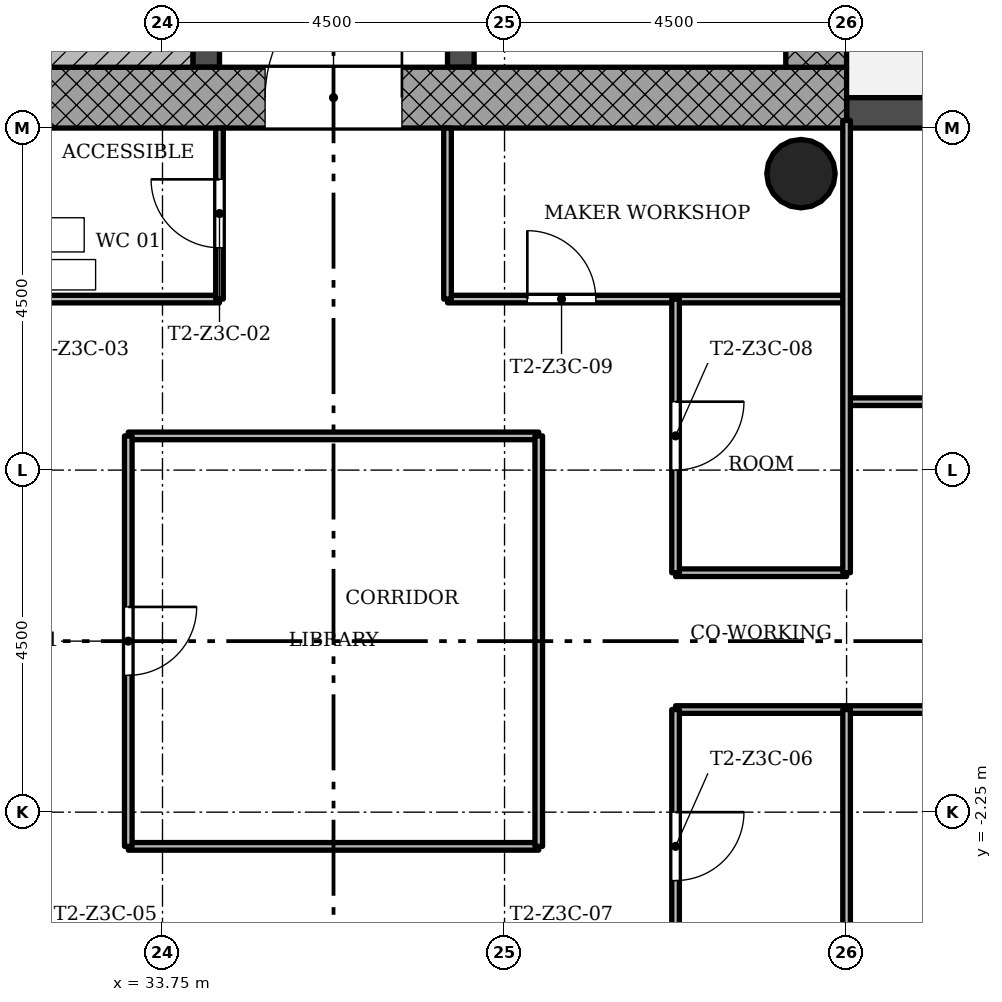
"""IFC4 building model, lengths in metres.
Left out: names, types, materials, properties, quantities, classifications, styles, units other than length and angle.
Written with IfcOpenShell. Run it as: python <this file> out.ifc"""

import sys

from ifc_helpers import new_model, si_unit, direction, frame, frame_2d, origin, origin_2d, place, context, subcontext, project, spatial, rectangle, hollow_circle, extrude, element, fill, save


model = new_model("IFC4")
c1 = context("Model", 3, precision=1e-05, world=origin(), true_north=direction((0.0, 1.0)))
c2 = subcontext(c1, "Body", "Model", "MODEL_VIEW")
j1 = project(units=[si_unit("LENGTHUNIT", "METRE"), si_unit("PLANEANGLEUNIT", "RADIAN")], contexts=[c1])
p1 = place(None, origin())
s1 = spatial("IfcSite", under=j1, at=p1, CompositionType="ELEMENT")
p2 = place(p1, origin())
s2 = spatial("IfcBuilding", under=s1, at=p2, CompositionType="ELEMENT")
p3 = place(p2, frame((0.0, 0.0, 160.9)))
s3 = spatial("IfcBuildingStorey", under=s2, at=p3, CompositionType="ELEMENT", Elevation=160.9)
p4 = place(p3, frame((30.05, 7.15, 0.0), z_axis=(0.0, 0.0, 1.0), x_axis=(1.0, 0.0, 0.0)))
e1 = element("IfcWall", 1, at=p4, inside=s3, PredefinedType="SHEAR", context=c2, shape_type="SweptSolid", body=[
    extrude(rectangle(XDim=12.7, YDim=0.8, at=frame_2d((6.35, 0.0))), origin(), (0.0, 0.0, 1.0), 3.4),
])
p5 = place(p4, frame((5.05, 0.0, 0.0)))
e2 = element("IfcOpeningElement", 2, at=p5, cuts=e1, PredefinedType="OPENING", context=c2, shape_type="SweptSolid", body=[
    extrude(rectangle(XDim=1.8, YDim=2.1, at=frame_2d((0.9, 1.05))), frame((0.0, 0.41, 0.0), z_axis=(0.0, -1.0, 0.0), x_axis=(1.0, 0.0, 0.0)), (0.0, 0.0, 1.0), 0.82),
])
p6 = place(p3, frame((42.35, 7.55, 0.0), z_axis=(0.0, 0.0, 1.0), x_axis=(0.0, 1.0, 0.0)))
e3 = element("IfcWall", 3, at=p6, inside=s3, PredefinedType="SHEAR", context=c2, shape_type="SweptSolid", body=[
    extrude(rectangle(XDim=8.2, YDim=0.8, at=frame_2d((4.1, 0.0))), origin(), (0.0, 0.0, 1.0), 3.4),
])
p7 = place(p3, frame((34.325, 7.55, 0.0), z_axis=(0.0, 0.0, 1.0), x_axis=(0.0, 1.0, 0.0)))
e4 = element("IfcWall", 4, at=p7, inside=s3, PredefinedType="SHEAR", context=c2, shape_type="SweptSolid", body=[
    extrude(rectangle(XDim=7.4, YDim=0.35, at=frame_2d((3.7, 0.0))), origin(), (0.0, 0.0, 1.0), 3.4),
])
p8 = place(p7, frame((0.85, 0.0, 0.0)))
e5 = element("IfcOpeningElement", 5, at=p8, cuts=e4, PredefinedType="OPENING", context=c2, shape_type="SweptSolid", body=[
    extrude(rectangle(XDim=0.9, YDim=2.1, at=frame_2d((0.45, 1.05))), frame((0.0, 0.185, 0.0), z_axis=(0.0, -1.0, 0.0), x_axis=(1.0, 0.0, 0.0)), (0.0, 0.0, 1.0), 0.37),
])
p9 = place(p3, frame((37.675, 7.55, 0.0), z_axis=(0.0, 0.0, 1.0), x_axis=(0.0, 1.0, 0.0)))
e6 = element("IfcWall", 6, at=p9, inside=s3, PredefinedType="SHEAR", context=c2, shape_type="SweptSolid", body=[
    extrude(rectangle(XDim=7.4, YDim=0.35, at=frame_2d((3.7, 0.0))), origin(), (0.0, 0.0, 1.0), 3.4),
])
p10 = place(p9, frame((0.95, 0.0, 0.0)))
e7 = element("IfcOpeningElement", 7, at=p10, cuts=e6, PredefinedType="OPENING", context=c2, shape_type="SweptSolid", body=[
    extrude(rectangle(XDim=1.1, YDim=2.1, at=frame_2d((0.55, 1.05))), frame((0.0, 0.185, 0.0), z_axis=(0.0, -1.0, 0.0), x_axis=(1.0, 0.0, 0.0)), (0.0, 0.0, 1.0), 0.37),
])
p11 = place(p9, frame((3.15, 0.0, 0.0)))
e8 = element("IfcOpeningElement", 8, at=p11, cuts=e6, PredefinedType="OPENING", context=c2, shape_type="SweptSolid", body=[
    extrude(rectangle(XDim=1.1, YDim=2.1, at=frame_2d((0.55, 1.05))), frame((0.0, 0.185, 0.0), z_axis=(0.0, -1.0, 0.0), x_axis=(1.0, 0.0, 0.0)), (0.0, 0.0, 1.0), 0.37),
])
p12 = place(p9, frame((5.35, 0.0, 0.0)))
e9 = element("IfcOpeningElement", 9, at=p12, cuts=e6, PredefinedType="OPENING", context=c2, shape_type="SweptSolid", body=[
    extrude(rectangle(XDim=1.1, YDim=2.1, at=frame_2d((0.55, 1.05))), frame((0.0, 0.185, 0.0), z_axis=(0.0, -1.0, 0.0), x_axis=(1.0, 0.0, 0.0)), (0.0, 0.0, 1.0), 0.37),
])
p13 = place(p3, frame((42.15, 6.15, 0.0), z_axis=(0.0, 0.0, 1.0), x_axis=(1.0, 0.0, 0.0)))
e10 = element("IfcColumn", 10, at=p13, inside=s3, PredefinedType="COLUMN", context=c2, shape_type="SweptSolid", body=[
    extrude(hollow_circle(Radius=0.45, WallThickness=0.032, at=origin_2d()), origin(), (0.0, 0.0, 1.0), 3.4),
])
p14 = place(p3, frame((47.25, 6.95, -0.02), z_axis=(0.0, 0.0, 1.0), x_axis=(-1.0, 0.0, 0.0)))
e11 = element("IfcWall", 11, at=p14, inside=s3, PredefinedType="STANDARD", context=c2, shape_type="SweptSolid", body=[
    extrude(rectangle(XDim=4.5, YDim=0.4, at=frame_2d((2.25, 0.0))), origin(), (0.0, 0.0, 1.0), 3.12),
])
p15 = place(p14, frame((1.35, 0.0, 0.02)))
e12 = element("IfcOpeningElement", 12, at=p15, cuts=e11, PredefinedType="OPENING", context=c2, shape_type="SweptSolid", body=[
    extrude(rectangle(XDim=1.8, YDim=2.1, at=frame_2d((0.9, 1.05))), frame((0.0, 0.21, 0.0), z_axis=(0.0, -1.0, 0.0), x_axis=(1.0, 0.0, 0.0)), (0.0, 0.0, 1.0), 0.42),
])
p16 = place(p3, frame((38.7, -2.7, 0.0), z_axis=(0.0, 0.0, 1.0), x_axis=(-1.0, 0.0, 0.0)))
e13 = element("IfcWall", 13, at=p16, inside=s3, PredefinedType="PARTITIONING", context=c2, shape_type="SweptSolid", body=[
    extrude(rectangle(XDim=5.4, YDim=0.1, at=frame_2d((2.7, 0.0))), origin(), (0.0, 0.0, 1.0), 3.0),
])
p17 = place(p3, frame((44.55, -0.9, 0.0), z_axis=(0.0, 0.0, 1.0), x_axis=(-1.0, 0.0, 0.0)))
e14 = element("IfcWall", 14, at=p17, inside=s3, PredefinedType="PARTITIONING", context=c2, shape_type="SweptSolid", body=[
    extrude(rectangle(XDim=4.05, YDim=0.1, at=frame_2d((2.025, 0.0))), origin(), (0.0, 0.0, 1.0), 3.0),
])
p18 = place(p3, frame((42.75, 0.9, 0.0), z_axis=(0.0, 0.0, 1.0), x_axis=(-1.0, 0.0, 0.0)))
e15 = element("IfcWall", 15, at=p18, inside=s3, PredefinedType="PARTITIONING", context=c2, shape_type="SweptSolid", body=[
    extrude(rectangle(XDim=2.25, YDim=0.1, at=frame_2d((1.125, 0.0))), origin(), (0.0, 0.0, 1.0), 3.0),
])
p19 = place(p3, frame((38.7, 2.7, 0.0), z_axis=(0.0, 0.0, 1.0), x_axis=(-1.0, 0.0, 0.0)))
e16 = element("IfcWall", 16, at=p19, inside=s3, PredefinedType="PARTITIONING", context=c2, shape_type="SweptSolid", body=[
    extrude(rectangle(XDim=5.4, YDim=0.1, at=frame_2d((2.7, 0.0))), origin(), (0.0, 0.0, 1.0), 3.0),
])
p20 = place(p3, frame((47.25, 3.15, 0.0), z_axis=(0.0, 0.0, 1.0), x_axis=(-1.0, 0.0, 0.0)))
e17 = element("IfcWall", 17, at=p20, inside=s3, PredefinedType="PARTITIONING", context=c2, shape_type="SweptSolid", body=[
    extrude(rectangle(XDim=4.5, YDim=0.1, at=frame_2d((2.25, 0.0))), origin(), (0.0, 0.0, 1.0), 3.0),
])
p21 = place(p20, frame((1.8, 0.0, 0.0)))
e18 = element("IfcOpeningElement", 18, at=p21, cuts=e17, PredefinedType="OPENING", context=c2, shape_type="SweptSolid", body=[
    extrude(rectangle(XDim=0.9, YDim=2.1, at=frame_2d((0.45, 1.05))), frame((0.0, 0.06, 0.0), z_axis=(0.0, -1.0, 0.0), x_axis=(1.0, 0.0, 0.0)), (0.0, 0.0, 1.0), 0.12),
])
p22 = place(p3, frame((42.75, 4.5, 0.0), z_axis=(0.0, 0.0, 1.0), x_axis=(-1.0, 0.0, 0.0)))
e19 = element("IfcWall", 19, at=p22, inside=s3, PredefinedType="PARTITIONING", context=c2, shape_type="SweptSolid", body=[
    extrude(rectangle(XDim=5.25, YDim=0.1, at=frame_2d((2.625, 0.0))), origin(), (0.0, 0.0, 1.0), 3.0),
])
p23 = place(p22, frame((3.3, 0.0, 0.0)))
e20 = element("IfcOpeningElement", 20, at=p23, cuts=e19, PredefinedType="OPENING", context=c2, shape_type="SweptSolid", body=[
    extrude(rectangle(XDim=0.9, YDim=2.1, at=frame_2d((0.45, 1.05))), frame((0.0, 0.06, 0.0), z_axis=(0.0, -1.0, 0.0), x_axis=(1.0, 0.0, 0.0)), (0.0, 0.0, 1.0), 0.12),
])
p24 = place(p3, frame((34.5, 4.5, 0.0), z_axis=(0.0, 0.0, 1.0), x_axis=(-1.0, 0.0, 0.0)))
e21 = element("IfcWall", 21, at=p24, inside=s3, PredefinedType="PARTITIONING", context=c2, shape_type="SweptSolid", body=[
    extrude(rectangle(XDim=3.0, YDim=0.1, at=frame_2d((1.5, 0.0))), origin(), (0.0, 0.0, 1.0), 3.0),
])
for number, where, z_axis, x_axis in (
    (22, (42.75, -6.85, 0.0), (0.0, 0.0, 1.0), (0.0, 1.0, 0.0)),
    (23, (42.75, 0.9, 0.0), (0.0, 0.0, 1.0), (0.0, 1.0, 0.0)),
):
    element("IfcWall", number, at=place(p3, frame(where, z_axis=z_axis, x_axis=x_axis)), inside=s3, PredefinedType="PARTITIONING", context=c2, shape_type="SweptSolid", body=[
        extrude(rectangle(XDim=5.95, YDim=0.1, at=frame_2d((2.975, 0.0))), origin(), (0.0, 0.0, 1.0), 3.0),
    ])
p25 = place(p3, frame((40.5, -6.75, 0.0), z_axis=(0.0, 0.0, 1.0), x_axis=(0.0, 1.0, 0.0)))
e24 = element("IfcWall", 24, at=p25, inside=s3, PredefinedType="PARTITIONING", context=c2, shape_type="SweptSolid", body=[
    extrude(rectangle(XDim=5.85, YDim=0.1, at=frame_2d((2.925, 0.0))), origin(), (0.0, 0.0, 1.0), 3.0),
])
p26 = place(p25, frame((3.6, 0.0, 0.0)))
e25 = element("IfcOpeningElement", 25, at=p26, cuts=e24, PredefinedType="OPENING", context=c2, shape_type="SweptSolid", body=[
    extrude(rectangle(XDim=0.9, YDim=2.1, at=frame_2d((0.45, 1.05))), frame((0.0, 0.06, 0.0), z_axis=(0.0, -1.0, 0.0), x_axis=(1.0, 0.0, 0.0)), (0.0, 0.0, 1.0), 0.12),
])
p27 = place(p3, frame((40.5, 0.9, 0.0), z_axis=(0.0, 0.0, 1.0), x_axis=(0.0, 1.0, 0.0)))
e26 = element("IfcWall", 26, at=p27, inside=s3, PredefinedType="PARTITIONING", context=c2, shape_type="SweptSolid", body=[
    extrude(rectangle(XDim=3.6, YDim=0.1, at=frame_2d((1.8, 0.0))), origin(), (0.0, 0.0, 1.0), 3.0),
])
p28 = place(p27, frame((1.35, 0.0, 0.0)))
e27 = element("IfcOpeningElement", 27, at=p28, cuts=e26, PredefinedType="OPENING", context=c2, shape_type="SweptSolid", body=[
    extrude(rectangle(XDim=0.9, YDim=2.1, at=frame_2d((0.45, 1.05))), frame((0.0, 0.06, 0.0), z_axis=(0.0, -1.0, 0.0), x_axis=(1.0, 0.0, 0.0)), (0.0, 0.0, 1.0), 0.12),
])
p29 = place(p3, frame((38.7, -2.7, 0.0), z_axis=(0.0, 0.0, 1.0), x_axis=(0.0, 1.0, 0.0)))
e28 = element("IfcWall", 28, at=p29, inside=s3, PredefinedType="PARTITIONING", context=c2, shape_type="SweptSolid", body=[
    extrude(rectangle(XDim=5.4, YDim=0.1, at=frame_2d((2.7, 0.0))), origin(), (0.0, 0.0, 1.0), 3.0),
])
p30 = place(p3, frame((37.5, 4.5, 0.0), z_axis=(0.0, 0.0, 1.0), x_axis=(0.0, 1.0, 0.0)))
e29 = element("IfcWall", 29, at=p30, inside=s3, PredefinedType="PARTITIONING", context=c2, shape_type="SweptSolid", body=[
    extrude(rectangle(XDim=2.25, YDim=0.1, at=frame_2d((1.125, 0.0))), origin(), (0.0, 0.0, 1.0), 3.0),
])
p31 = place(p3, frame((34.5, 4.5, 0.0), z_axis=(0.0, 0.0, 1.0), x_axis=(0.0, 1.0, 0.0)))
e30 = element("IfcWall", 30, at=p31, inside=s3, PredefinedType="PARTITIONING", context=c2, shape_type="SweptSolid", body=[
    extrude(rectangle(XDim=2.25, YDim=0.1, at=frame_2d((1.125, 0.0))), origin(), (0.0, 0.0, 1.0), 3.0),
])
p32 = place(p31, frame((0.675, 0.0, 0.0)))
e31 = element("IfcOpeningElement", 31, at=p32, cuts=e30, PredefinedType="OPENING", context=c2, shape_type="SweptSolid", body=[
    extrude(rectangle(XDim=0.9, YDim=2.1, at=frame_2d((0.45, 1.05))), frame((0.0, 0.06, 0.0), z_axis=(0.0, -1.0, 0.0), x_axis=(1.0, 0.0, 0.0)), (0.0, 0.0, 1.0), 0.12),
])
p33 = place(p3, frame((33.3, -2.7, 0.0), z_axis=(0.0, 0.0, 1.0), x_axis=(0.0, 1.0, 0.0)))
e32 = element("IfcWall", 32, at=p33, inside=s3, PredefinedType="PARTITIONING", context=c2, shape_type="SweptSolid", body=[
    extrude(rectangle(XDim=5.4, YDim=0.1, at=frame_2d((2.7, 0.0))), origin(), (0.0, 0.0, 1.0), 3.0),
])
p34 = place(p33, frame((2.25, 0.0, 0.0)))
e33 = element("IfcOpeningElement", 33, at=p34, cuts=e32, PredefinedType="OPENING", context=c2, shape_type="SweptSolid", body=[
    extrude(rectangle(XDim=0.9, YDim=2.1, at=frame_2d((0.45, 1.05))), frame((0.0, 0.06, 0.0), z_axis=(0.0, -1.0, 0.0), x_axis=(1.0, 0.0, 0.0)), (0.0, 0.0, 1.0), 0.12),
])
p35 = place(p3, frame((34.15, 7.75, 0.0), z_axis=(0.0, 0.0, 1.0), x_axis=(-1.0, 0.0, 0.0)))
e34 = element("IfcWall", 34, at=p35, inside=s3, PredefinedType="SHEAR", context=c2, shape_type="SweptSolid", body=[
    extrude(rectangle(XDim=4.1, YDim=0.4, at=frame_2d((2.05, 0.0))), origin(), (0.0, 0.0, 1.0), 3.4),
])
p36 = place(p34, origin())
e35 = element("IfcDoor", 35, at=p36, inside=s3, OperationType="SINGLE_SWING_RIGHT", PredefinedType="DOOR", context=c2, shape_type="SweptSolid", body=[
    extrude(rectangle(XDim=0.9, YDim=2.1, at=frame_2d((0.45, 1.05))), frame((0.0, 0.025, 0.0), z_axis=(0.0, -1.0, 0.0), x_axis=(1.0, 0.0, 0.0)), (0.0, 0.0, 1.0), 0.05),
])
fill(e33, e35)
p37 = place(p32, origin())
e36 = element("IfcDoor", 36, at=p37, inside=s3, OperationType="SINGLE_SWING_LEFT", PredefinedType="DOOR", context=c2, shape_type="SweptSolid", body=[
    extrude(rectangle(XDim=0.9, YDim=2.1, at=frame_2d((0.45, 1.05))), frame((0.0, 0.025, 0.0), z_axis=(0.0, -1.0, 0.0), x_axis=(1.0, 0.0, 0.0)), (0.0, 0.0, 1.0), 0.05),
])
fill(e31, e36)
p38 = place(p26, origin())
e37 = element("IfcDoor", 37, at=p38, inside=s3, OperationType="SINGLE_SWING_RIGHT", PredefinedType="DOOR", context=c2, shape_type="SweptSolid", body=[
    extrude(rectangle(XDim=0.9, YDim=2.1, at=frame_2d((0.45, 1.05))), frame((0.0, 0.025, 0.0), z_axis=(0.0, -1.0, 0.0), x_axis=(1.0, 0.0, 0.0)), (0.0, 0.0, 1.0), 0.05),
])
fill(e25, e37)
p39 = place(p28, origin())
e38 = element("IfcDoor", 38, at=p39, inside=s3, OperationType="SINGLE_SWING_RIGHT", PredefinedType="DOOR", context=c2, shape_type="SweptSolid", body=[
    extrude(rectangle(XDim=0.9, YDim=2.1, at=frame_2d((0.45, 1.05))), frame((0.0, 0.025, 0.0), z_axis=(0.0, -1.0, 0.0), x_axis=(1.0, 0.0, 0.0)), (0.0, 0.0, 1.0), 0.05),
])
fill(e27, e38)
p40 = place(p23, origin())
e39 = element("IfcDoor", 39, at=p40, inside=s3, OperationType="SINGLE_SWING_RIGHT", PredefinedType="DOOR", context=c2, shape_type="SweptSolid", body=[
    extrude(rectangle(XDim=0.9, YDim=2.1, at=frame_2d((0.45, 1.05))), frame((0.0, 0.025, 0.0), z_axis=(0.0, -1.0, 0.0), x_axis=(1.0, 0.0, 0.0)), (0.0, 0.0, 1.0), 0.05),
])
fill(e20, e39)
p41 = place(p5, origin())
e40 = element("IfcDoor", 40, at=p41, inside=s3, OperationType="SINGLE_SWING_LEFT", PredefinedType="DOOR", context=c2, shape_type="SweptSolid", body=[
    extrude(rectangle(XDim=1.8, YDim=2.1, at=frame_2d((0.9, 1.05))), frame((0.0, 0.025, 0.0), z_axis=(0.0, -1.0, 0.0), x_axis=(1.0, 0.0, 0.0)), (0.0, 0.0, 1.0), 0.05),
])
fill(e2, e40)
save(model, sys.argv[1])
